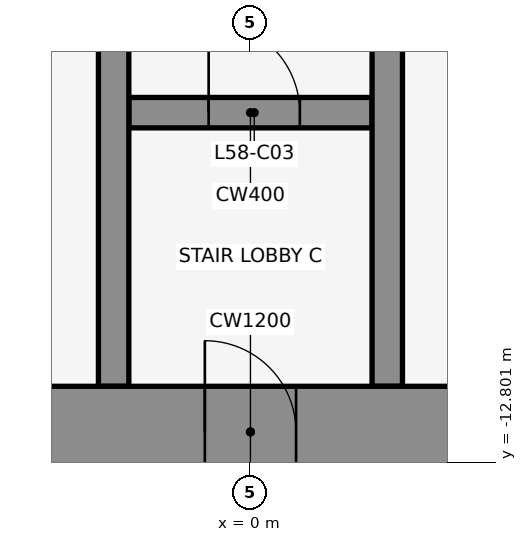
"""IFC4 building model, lengths in metres.
Left out: names, types, materials, properties, quantities, classifications, styles, units other than length and angle.
Written with IfcOpenShell. Run it as: python <this file> out.ifc"""

import sys

from ifc_helpers import new_model, si_unit, direction, frame, frame_2d, origin, place, context, subcontext, project, spatial, rectangle, extrude, element, fill, save


model = new_model("IFC4")
c1 = context("Model", 3, precision=1e-05, world=origin(), true_north=direction((0.0, 1.0)))
c2 = subcontext(c1, "Body", "Model", "MODEL_VIEW")
j1 = project(units=[si_unit("LENGTHUNIT", "METRE"), si_unit("PLANEANGLEUNIT", "RADIAN")], contexts=[c1])
p1 = place(None, origin())
s1 = spatial("IfcSite", under=j1, at=p1, CompositionType="ELEMENT")
p2 = place(p1, origin())
s2 = spatial("IfcBuilding", under=s1, at=p2, CompositionType="ELEMENT")
p3 = place(p2, frame((0.0, 0.0, 258.2)))
s3 = spatial("IfcBuildingStorey", under=s2, at=p3, CompositionType="ELEMENT", Elevation=258.2)
p4 = place(p3, frame((-1.6, -8.2, 0.0), z_axis=(0.0, 0.0, 1.0), x_axis=(1.0, 0.0, 0.0)))
e1 = element("IfcWall", 1, at=p4, inside=s3, PredefinedType="SHEAR", context=c2, shape_type="SweptSolid", body=[
    extrude(rectangle(XDim=3.2, YDim=0.4, at=frame_2d((1.6, 0.0))), origin(), (0.0, 0.0, 1.0), 4.2),
])
p5 = place(p4, frame((1.05, 0.0, 0.0)))
e2 = element("IfcOpeningElement", 2, at=p5, cuts=e1, PredefinedType="OPENING", context=c2, shape_type="SweptSolid", body=[
    extrude(rectangle(XDim=1.2, YDim=2.1, at=frame_2d((0.6, 1.05))), frame((0.0, 0.212, 0.0), z_axis=(0.0, -1.0, 0.0), x_axis=(1.0, 0.0, 0.0)), (0.0, 0.0, 1.0), 0.424),
])
for number, where, z_axis, x_axis in (
    (3, (-1.8, -11.8, 0.0), (0.0, 0.0, 1.0), (0.0, 1.0, 0.0)),
    (4, (1.8, -11.8, 0.0), (0.0, 0.0, 1.0), (0.0, 1.0, 0.0)),
):
    element("IfcWall", number, at=place(p3, frame(where, z_axis=z_axis, x_axis=x_axis)), inside=s3, PredefinedType="SHEAR", context=c2, shape_type="SweptSolid", body=[
        extrude(rectangle(XDim=10.6, YDim=0.4, at=frame_2d((5.3, 0.0))), origin(), (0.0, 0.0, 1.0), 4.2),
    ])
p6 = place(p3, frame((-22.0, -12.4, 0.0), z_axis=(0.0, 0.0, 1.0), x_axis=(1.0, 0.0, 0.0)))
e5 = element("IfcWall", 5, at=p6, inside=s3, PredefinedType="SHEAR", context=c2, shape_type="SweptSolid", body=[
    extrude(rectangle(XDim=44.0, YDim=1.2, at=frame_2d((22.0, 0.0))), origin(), (0.0, 0.0, 1.0), 4.2),
])
p7 = place(p6, frame((2.2, 0.0, 0.0)))
e6 = element("IfcOpeningElement", 6, at=p7, cuts=e5, PredefinedType="OPENING", context=c2, shape_type="SweptSolid", body=[
    extrude(rectangle(XDim=1.2, YDim=2.1, at=frame_2d((0.6, 1.05))), frame((0.0, 0.612, 0.0), z_axis=(0.0, -1.0, 0.0), x_axis=(1.0, 0.0, 0.0)), (0.0, 0.0, 1.0), 1.224),
])
p8 = place(p6, frame((21.4, 0.0, 0.0)))
e7 = element("IfcOpeningElement", 7, at=p8, cuts=e5, PredefinedType="OPENING", context=c2, shape_type="SweptSolid", body=[
    extrude(rectangle(XDim=1.2, YDim=2.1, at=frame_2d((0.6, 1.05))), frame((0.0, 0.612, 0.0), z_axis=(0.0, -1.0, 0.0), x_axis=(1.0, 0.0, 0.0)), (0.0, 0.0, 1.0), 1.224),
])
p9 = place(p6, frame((40.6, 0.0, 0.0)))
e8 = element("IfcOpeningElement", 8, at=p9, cuts=e5, PredefinedType="OPENING", context=c2, shape_type="SweptSolid", body=[
    extrude(rectangle(XDim=1.2, YDim=2.1, at=frame_2d((0.6, 1.05))), frame((0.0, 0.612, 0.0), z_axis=(0.0, -1.0, 0.0), x_axis=(1.0, 0.0, 0.0)), (0.0, 0.0, 1.0), 1.224),
])
p10 = place(p6, frame((16.0, 0.0, 0.0)))
e9 = element("IfcOpeningElement", 9, at=p10, cuts=e5, PredefinedType="OPENING", context=c2, shape_type="SweptSolid", body=[
    extrude(rectangle(XDim=1.8, YDim=2.1, at=frame_2d((0.9, 1.05))), frame((0.0, 0.612, 0.0), z_axis=(0.0, -1.0, 0.0), x_axis=(1.0, 0.0, 0.0)), (0.0, 0.0, 1.0), 1.224),
])
p11 = place(p6, frame((6.3, 0.0, 0.0)))
e10 = element("IfcOpeningElement", 10, at=p11, cuts=e5, PredefinedType="OPENING", context=c2, shape_type="SweptSolid", body=[
    extrude(rectangle(XDim=1.2, YDim=2.1, at=frame_2d((0.6, 1.05))), frame((0.0, 0.612, 0.0), z_axis=(0.0, -1.0, 0.0), x_axis=(1.0, 0.0, 0.0)), (0.0, 0.0, 1.0), 1.224),
])
p12 = place(p6, frame((26.2, 0.0, 0.0)))
e11 = element("IfcOpeningElement", 11, at=p12, cuts=e5, PredefinedType="OPENING", context=c2, shape_type="SweptSolid", body=[
    extrude(rectangle(XDim=1.8, YDim=2.1, at=frame_2d((0.9, 1.05))), frame((0.0, 0.612, 0.0), z_axis=(0.0, -1.0, 0.0), x_axis=(1.0, 0.0, 0.0)), (0.0, 0.0, 1.0), 1.224),
])
p13 = place(p6, frame((36.5, 0.0, 0.0)))
e12 = element("IfcOpeningElement", 12, at=p13, cuts=e5, PredefinedType="OPENING", context=c2, shape_type="SweptSolid", body=[
    extrude(rectangle(XDim=1.2, YDim=2.1, at=frame_2d((0.6, 1.05))), frame((0.0, 0.612, 0.0), z_axis=(0.0, -1.0, 0.0), x_axis=(1.0, 0.0, 0.0)), (0.0, 0.0, 1.0), 1.224),
])
p14 = place(p5, origin())
e13 = element("IfcDoor", 13, at=p14, inside=s3, OperationType="SINGLE_SWING_LEFT", PredefinedType="DOOR", context=c2, shape_type="SweptSolid", body=[
    extrude(rectangle(XDim=1.2, YDim=2.1, at=frame_2d((0.6, 1.05))), frame((0.0, 0.025, 0.0), z_axis=(0.0, -1.0, 0.0), x_axis=(1.0, 0.0, 0.0)), (0.0, 0.0, 1.0), 0.05),
])
fill(e2, e13)
p15 = place(p8, frame((1.2, 0.0, 0.0), z_axis=(0.0, 0.0, 1.0), x_axis=(-1.0, 0.0, 0.0)))
e14 = element("IfcDoor", 14, at=p15, inside=s3, OperationType="SINGLE_SWING_RIGHT", PredefinedType="DOOR", context=c2, shape_type="SweptSolid", body=[
    extrude(rectangle(XDim=1.2, YDim=2.1, at=frame_2d((0.6, 1.05))), frame((0.0, 0.025, 0.0), z_axis=(0.0, -1.0, 0.0), x_axis=(1.0, 0.0, 0.0)), (0.0, 0.0, 1.0), 0.05),
])
fill(e7, e14)
save(model, sys.argv[1])
